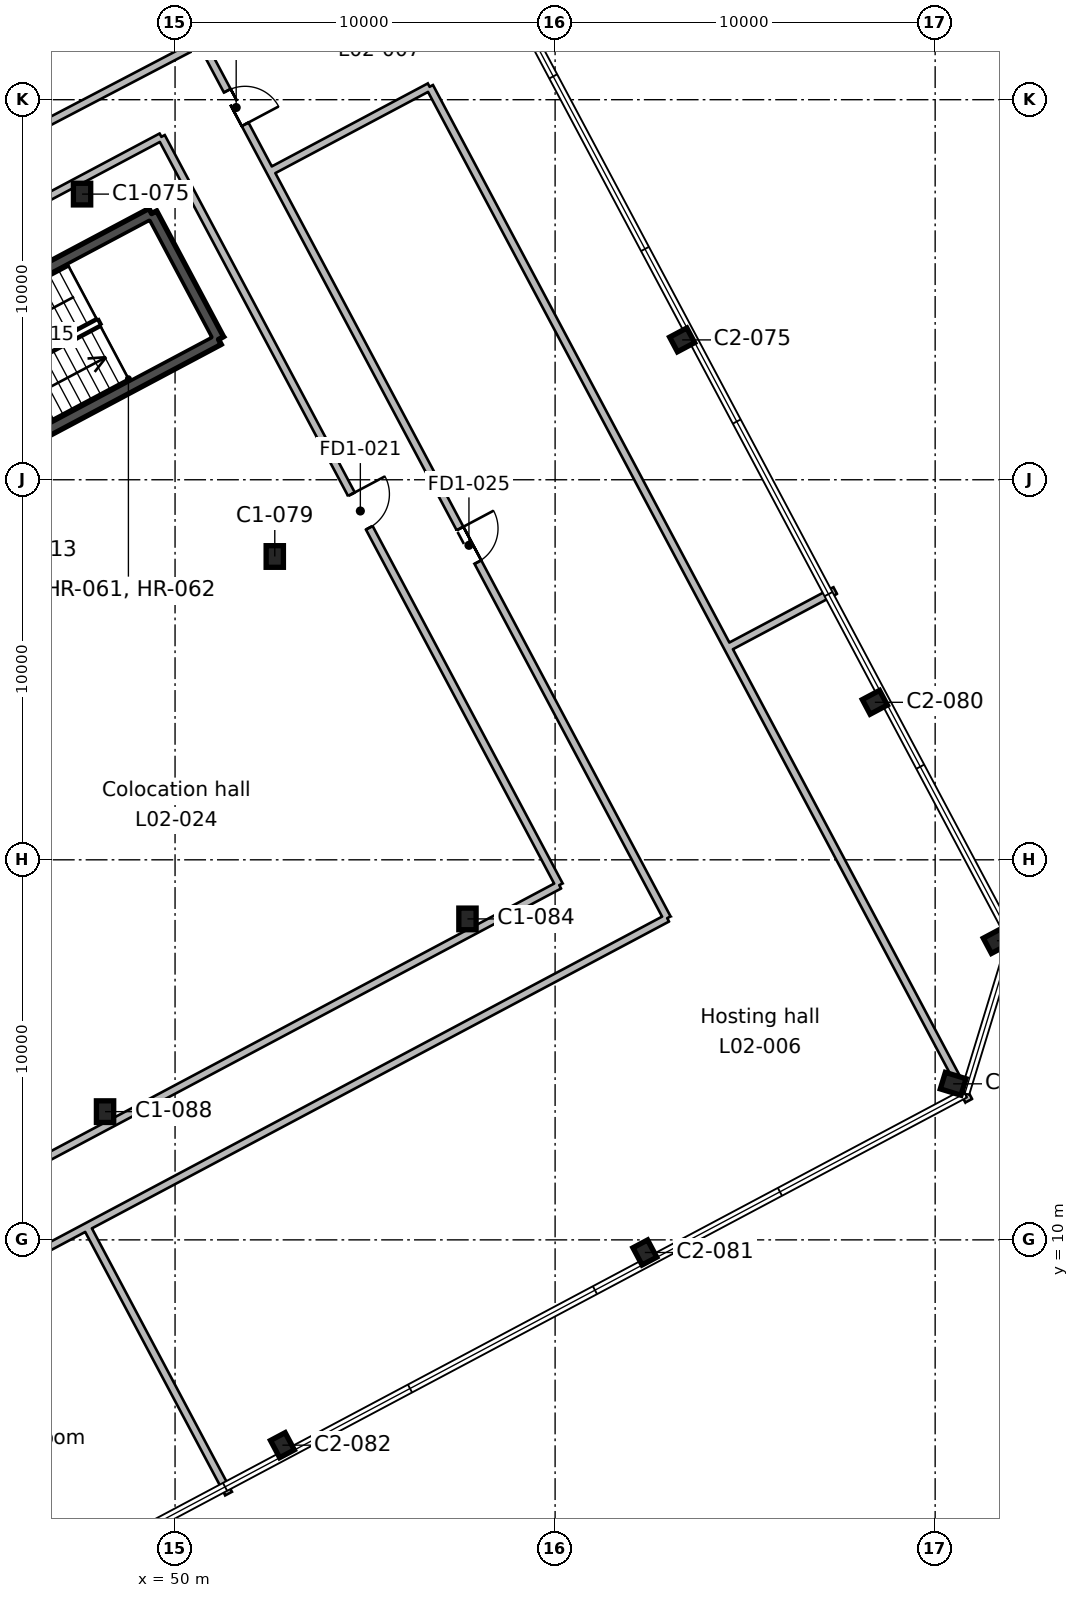
"""IFC4 building model, lengths in metres.
Left out: names, types, materials, properties, quantities, classifications, styles, units other than length and angle.
Written with IfcOpenShell. Run it as: python <this file> out.ifc"""

import sys

from ifc_helpers import new_model, si_unit, direction, frame, frame_2d, origin, origin_2d, place, context, subcontext, project, spatial, rectangle, i_section, extrude, element, fill, save


model = new_model("IFC4")
c1 = context("Model", 3, precision=1e-05, world=origin(), true_north=direction((0.0, 1.0)))
c2 = subcontext(c1, "Body", "Model", "MODEL_VIEW")
j1 = project(units=[si_unit("LENGTHUNIT", "METRE"), si_unit("PLANEANGLEUNIT", "RADIAN")], contexts=[c1])
p1 = place(None, origin())
s1 = spatial("IfcSite", under=j1, at=p1, CompositionType="ELEMENT")
p2 = place(p1, origin())
s2 = spatial("IfcBuilding", under=s1, at=p2, CompositionType="ELEMENT")
p3 = place(p2, frame((0.0, 0.0, 12.2)))
s3 = spatial("IfcBuildingStorey", under=s2, at=p3, CompositionType="ELEMENT", Elevation=12.2)
for number, where, z_axis, x_axis in (
    (1, (52.825, 4.598, 0.0), (0.0, 0.0, 1.0), (0.883, 0.469, 0.0)),
    (2, (62.361, 9.668, 0.0), (0.0, 0.0, 1.0), (0.883, 0.469, 0.0)),
):
    element("IfcColumn", number, at=place(p3, frame(where, z_axis=z_axis, x_axis=x_axis)), inside=s3, PredefinedType="COLUMN", context=c2, shape_type="SweptSolid", body=[
        extrude(i_section(OverallWidth=0.437, OverallDepth=0.513, WebThickness=0.061, FlangeThickness=0.097, FilletRadius=0.015, at=origin_2d()), origin(), (0.0, 0.0, 1.0), 5.4),
    ])
for number, where, z_axis, x_axis in (
    (3, (48.158, 13.374, 0.0), (0.0, 0.0, 1.0), (1.0, 0.0, 0.0)),
    (4, (70.474, 14.106, 0.0), (0.0, 0.0, 1.0), (0.292, 0.956, 0.0)),
    (5, (71.625, 17.871, 0.0), (0.0, 0.0, 1.0), (-0.469, 0.883, 0.0)),
    (6, (57.694, 18.445, 0.0), (0.0, 0.0, 1.0), (1.0, 0.0, 0.0)),
):
    element("IfcColumn", number, at=place(p3, frame(where, z_axis=z_axis, x_axis=x_axis)), inside=s3, PredefinedType="COLUMN", context=c2, shape_type="SweptSolid", body=[
        extrude(i_section(OverallWidth=0.455, OverallDepth=0.569, WebThickness=0.078, FlangeThickness=0.125, FilletRadius=0.015, at=origin_2d()), origin(), (0.0, 0.0, 1.0), 5.4),
    ])
p4 = place(p3, frame((68.413, 24.144, 0.0), z_axis=(0.0, 0.0, 1.0), x_axis=(-0.469471562786, 0.882947592859, 0.0)))
e7 = element("IfcColumn", 7, at=p4, inside=s3, PredefinedType="COLUMN", context=c2, shape_type="SweptSolid", body=[
    extrude(i_section(OverallWidth=0.437, OverallDepth=0.513, WebThickness=0.061, FlangeThickness=0.097, FilletRadius=0.015, at=origin_2d()), origin(), (0.0, 0.0, 1.0), 5.4),
])
p5 = place(p3, frame((52.624, 27.981, 0.0), z_axis=(0.0, 0.0, 1.0), x_axis=(1.0, 0.0, 0.0)))
e8 = element("IfcColumn", 8, at=p5, inside=s3, PredefinedType="COLUMN", context=c2, shape_type="SweptSolid", body=[
    extrude(i_section(OverallWidth=0.455, OverallDepth=0.569, WebThickness=0.078, FlangeThickness=0.125, FilletRadius=0.015, at=origin_2d()), origin(), (0.0, 0.0, 1.0), 5.4),
])
p6 = place(p3, frame((63.343, 33.68, 0.0), z_axis=(0.0, 0.0, 1.0), x_axis=(-0.469471562786, 0.882947592859, 0.0)))
e9 = element("IfcColumn", 9, at=p6, inside=s3, PredefinedType="COLUMN", context=c2, shape_type="SweptSolid", body=[
    extrude(i_section(OverallWidth=0.437, OverallDepth=0.513, WebThickness=0.061, FlangeThickness=0.097, FilletRadius=0.015, at=origin_2d()), origin(), (0.0, 0.0, 1.0), 5.4),
])
p7 = place(p3, frame((47.553, 37.516, 0.0), z_axis=(0.0, 0.0, 1.0), x_axis=(1.0, 0.0, 0.0)))
e10 = element("IfcColumn", 10, at=p7, inside=s3, PredefinedType="COLUMN", context=c2, shape_type="SweptSolid", body=[
    extrude(i_section(OverallWidth=0.455, OverallDepth=0.569, WebThickness=0.078, FlangeThickness=0.125, FilletRadius=0.015, at=origin_2d()), origin(), (0.0, 0.0, 1.0), 5.4),
])
p8 = place(p3, frame((49.384, 37.004, 0.0), z_axis=(0.0, 0.0, 1.0), x_axis=(0.46946936446, -0.882948761726, 0.0)))
e11 = element("IfcWall", 11, at=p8, inside=s3, PredefinedType="SHEAR", context=c2, shape_type="SweptSolid", body=[
    extrude(rectangle(XDim=3.75, YDim=0.3, at=frame_2d((1.875, 0.0))), origin(), (0.0, 0.0, 1.0), 5.4),
])
p9 = place(p3, frame((51.145, 33.693, 0.0), z_axis=(0.0, 0.0, 1.0), x_axis=(-0.882945809314, -0.469474917132, 0.0)))
e12 = element("IfcWall", 12, at=p9, inside=s3, PredefinedType="SHEAR", context=c2, shape_type="SweptSolid", body=[
    extrude(rectangle(XDim=8.3, YDim=0.3, at=frame_2d((4.15, 0.0))), origin(), (0.0, 0.0, 1.0), 5.4),
])
p10 = place(p9, frame((6.725, 0.0, 0.0)))
e13 = element("IfcOpeningElement", 13, at=p10, cuts=e12, PredefinedType="OPENING", context=c2, shape_type="SweptSolid", body=[
    extrude(rectangle(XDim=1.2, YDim=2.1, at=frame_2d((0.6, 1.05))), frame((0.0, 0.16, 0.0), z_axis=(0.0, -1.0, 0.0), x_axis=(1.0, 0.0, 0.0)), (0.0, 0.0, 1.0), 0.32),
])
p11 = place(p3, frame((42.055, 33.107, 0.0), z_axis=(0.0, 0.0, 1.0), x_axis=(0.882945809314, 0.469474917132, 0.0)))
e14 = element("IfcWall", 14, at=p11, inside=s3, PredefinedType="SHEAR", context=c2, shape_type="SweptSolid", body=[
    extrude(rectangle(XDim=8.3, YDim=0.3, at=frame_2d((4.15, 0.0))), origin(), (0.0, 0.0, 1.0), 5.4),
])
p12 = place(p3, frame((0.0, 15.007, 0.0), z_axis=(0.0, 0.0, 1.0), x_axis=(0.886151087154, 0.463396429352, 0.0)))
e15 = element("IfcWall", 15, at=p12, inside=s3, PredefinedType="PARTITIONING", context=c2, shape_type="SweptSolid", body=[
    extrude(rectangle(XDim=57.206, YDim=0.2, at=frame_2d((28.603, 0.0))), origin(), (0.0, 0.0, 1.0), 4.95),
])
p13 = place(p12, frame((35.149, 0.0, 0.0)))
e16 = element("IfcOpeningElement", 16, at=p13, cuts=e15, PredefinedType="OPENING", context=c2, shape_type="SweptSolid", body=[
    extrude(rectangle(XDim=1.0, YDim=2.1, at=frame_2d((0.5, 1.05))), frame((0.0, 0.11, 0.0), z_axis=(0.0, -1.0, 0.0), x_axis=(1.0, 0.0, 0.0)), (0.0, 0.0, 1.0), 0.22),
])
p14 = place(p12, frame((28.15, 0.0, 0.0)))
e17 = element("IfcOpeningElement", 17, at=p14, cuts=e15, PredefinedType="OPENING", context=c2, shape_type="SweptSolid", body=[
    extrude(rectangle(XDim=1.0, YDim=2.1, at=frame_2d((0.5, 1.05))), frame((0.0, 0.11, 0.0), z_axis=(0.0, -1.0, 0.0), x_axis=(1.0, 0.0, 0.0)), (0.0, 0.0, 1.0), 0.22),
])
p15 = place(p12, frame((23.949, 0.0, 0.0)))
e18 = element("IfcOpeningElement", 18, at=p15, cuts=e15, PredefinedType="OPENING", context=c2, shape_type="SweptSolid", body=[
    extrude(rectangle(XDim=1.0, YDim=2.1, at=frame_2d((0.5, 1.05))), frame((0.0, 0.11, 0.0), z_axis=(0.0, -1.0, 0.0), x_axis=(1.0, 0.0, 0.0)), (0.0, 0.0, 1.0), 0.22),
])
p16 = place(p12, frame((8.25, 0.0, 0.0)))
e19 = element("IfcOpeningElement", 19, at=p16, cuts=e15, PredefinedType="OPENING", context=c2, shape_type="SweptSolid", body=[
    extrude(rectangle(XDim=0.95, YDim=2.1, at=frame_2d((0.475, 1.05))), frame((0.0, 0.11, 0.0), z_axis=(0.0, -1.0, 0.0), x_axis=(1.0, 0.0, 0.0)), (0.0, 0.0, 1.0), 0.22),
])
p17 = place(p3, frame((47.736, 10.375, 0.0), z_axis=(0.0, 0.0, 1.0), x_axis=(-0.882953206174, -0.469461005524, 0.0)))
e20 = element("IfcWall", 20, at=p17, inside=s3, PredefinedType="PARTITIONING", context=c2, shape_type="SweptSolid", body=[
    extrude(rectangle(XDim=38.661, YDim=0.2, at=frame_2d((19.331, 0.0))), origin(), (0.0, 0.0, 1.0), 4.95),
])
p18 = place(p17, frame((18.85, 0.0, 0.0)))
e21 = element("IfcOpeningElement", 21, at=p18, cuts=e20, PredefinedType="OPENING", context=c2, shape_type="SweptSolid", body=[
    extrude(rectangle(XDim=1.0, YDim=2.1, at=frame_2d((0.5, 1.05))), frame((0.0, 0.11, 0.0), z_axis=(0.0, -1.0, 0.0), x_axis=(1.0, 0.0, 0.0)), (0.0, 0.0, 1.0), 0.22),
])
p19 = place(p17, frame((15.45, 0.0, 0.0)))
e22 = element("IfcOpeningElement", 22, at=p19, cuts=e20, PredefinedType="OPENING", context=c2, shape_type="SweptSolid", body=[
    extrude(rectangle(XDim=1.0, YDim=2.1, at=frame_2d((0.5, 1.05))), frame((0.0, 0.11, 0.0), z_axis=(0.0, -1.0, 0.0), x_axis=(1.0, 0.0, 0.0)), (0.0, 0.0, 1.0), 0.22),
])
p20 = place(p3, frame((47.677, 10.344, 0.0), z_axis=(0.0, 0.0, 1.0), x_axis=(0.46930940005, -0.883033797215, 0.0)))
e23 = element("IfcWall", 23, at=p20, inside=s3, PredefinedType="PARTITIONING", context=c2, shape_type="SweptSolid", body=[
    extrude(rectangle(XDim=7.95, YDim=0.2, at=frame_2d((3.975, 0.0))), origin(), (0.0, 0.0, 1.0), 4.95),
])
p21 = place(p3, frame((38.546, 40.882, 0.0), z_axis=(0.0, 0.0, 1.0), x_axis=(0.882973874067, 0.469422131685, 0.0)))
e24 = element("IfcWall", 24, at=p21, inside=s3, PredefinedType="PARTITIONING", context=c2, shape_type="SweptSolid", body=[
    extrude(rectangle(XDim=12.773, YDim=0.2, at=frame_2d((6.386, 0.0))), origin(), (0.0, 0.0, 1.0), 4.95),
])
p22 = place(p3, frame((43.858, 35.948, 0.0), z_axis=(0.0, 0.0, 1.0), x_axis=(0.882949648076, 0.469467697464, 0.0)))
e25 = element("IfcWall", 25, at=p22, inside=s3, PredefinedType="PARTITIONING", context=c2, shape_type="SweptSolid", body=[
    extrude(rectangle(XDim=6.55, YDim=0.2, at=frame_2d((3.275, 0.0))), origin(), (0.0, 0.0, 1.0), 4.95),
])
p23 = place(p3, frame((49.641, 39.023, 0.0), z_axis=(0.0, 0.0, 1.0), x_axis=(0.469459906809, -0.882953790353, 0.0)))
e26 = element("IfcWall", 26, at=p23, inside=s3, PredefinedType="PARTITIONING", context=c2, shape_type="SweptSolid", body=[
    extrude(rectangle(XDim=22.3, YDim=0.2, at=frame_2d((11.15, 0.0))), origin(), (0.0, 0.0, 1.0), 4.95),
])
p24 = place(p23, frame((10.65, 0.0, 0.0)))
e27 = element("IfcOpeningElement", 27, at=p24, cuts=e26, PredefinedType="OPENING", context=c2, shape_type="SweptSolid", body=[
    extrude(rectangle(XDim=1.0, YDim=2.1, at=frame_2d((0.5, 1.05))), frame((0.0, 0.11, 0.0), z_axis=(0.0, -1.0, 0.0), x_axis=(1.0, 0.0, 0.0)), (0.0, 0.0, 1.0), 0.22),
])
p25 = place(p3, frame((60.11, 19.333, 0.0), z_axis=(0.0, 0.0, 1.0), x_axis=(-0.882943552693, -0.469479161154, 0.0)))
e28 = element("IfcWall", 28, at=p25, inside=s3, PredefinedType="PARTITIONING", context=c2, shape_type="SweptSolid", body=[
    extrude(rectangle(XDim=22.15, YDim=0.2, at=frame_2d((11.075, 0.0))), origin(), (0.0, 0.0, 1.0), 4.95),
])
p26 = place(p3, frame((52.545, 38.033, 0.0), z_axis=(0.0, 0.0, 1.0), x_axis=(0.469474673387, -0.882945938916, 0.0)))
e29 = element("IfcWall", 29, at=p26, inside=s3, PredefinedType="PARTITIONING", context=c2, shape_type="SweptSolid", body=[
    extrude(rectangle(XDim=22.163, YDim=0.2, at=frame_2d((11.082, 0.0))), origin(), (0.0, 0.0, 1.0), 4.95),
])
p27 = place(p26, frame((10.551, 0.0, 0.0)))
e30 = element("IfcOpeningElement", 30, at=p27, cuts=e29, PredefinedType="OPENING", context=c2, shape_type="SweptSolid", body=[
    extrude(rectangle(XDim=1.0, YDim=2.1, at=frame_2d((0.5, 1.05))), frame((0.0, 0.11, 0.0), z_axis=(0.0, -1.0, 0.0), x_axis=(1.0, 0.0, 0.0)), (0.0, 0.0, 1.0), 0.22),
])
p28 = place(p3, frame((62.95, 18.464, 0.0), z_axis=(0.0, 0.0, 1.0), x_axis=(-0.882953495127, -0.469460462065, 0.0)))
e31 = element("IfcWall", 31, at=p28, inside=s3, PredefinedType="PARTITIONING", context=c2, shape_type="SweptSolid", body=[
    extrude(rectangle(XDim=17.231, YDim=0.2, at=frame_2d((8.615, 0.0))), origin(), (0.0, 0.0, 1.0), 4.95),
])
p29 = place(p3, frame((50.693, 41.516, 0.0), z_axis=(0.0, 0.0, 1.0), x_axis=(0.469428212836, -0.882970641071, 0.0)))
e32 = element("IfcWall", 32, at=p29, inside=s3, PredefinedType="PARTITIONING", context=c2, shape_type="SweptSolid", body=[
    extrude(rectangle(XDim=3.945, YDim=0.2, at=frame_2d((1.972, 0.0))), origin(), (0.0, 0.0, 1.0), 4.95),
])
p30 = place(p29, frame((1.45, 0.0, 0.0)))
e33 = element("IfcOpeningElement", 33, at=p30, cuts=e32, PredefinedType="OPENING", context=c2, shape_type="SweptSolid", body=[
    extrude(rectangle(XDim=1.0, YDim=2.1, at=frame_2d((0.5, 1.05))), frame((0.0, 0.11, 0.0), z_axis=(0.0, -1.0, 0.0), x_axis=(1.0, 0.0, 0.0)), (0.0, 0.0, 1.0), 0.22),
])
p31 = place(p3, frame((52.52, 38.118, 0.0), z_axis=(0.0, 0.0, 1.0), x_axis=(0.882886497292, 0.469586448802, 0.0)))
e34 = element("IfcWall", 34, at=p31, inside=s3, PredefinedType="PARTITIONING", context=c2, shape_type="SweptSolid", body=[
    extrude(rectangle(XDim=4.732, YDim=0.2, at=frame_2d((2.366, 0.0))), origin(), (0.0, 0.0, 1.0), 4.95),
])
p32 = place(p3, frame((56.698, 40.34, 0.0), z_axis=(0.0, 0.0, 1.0), x_axis=(0.469433248113, -0.882967964065, 0.0)))
e35 = element("IfcWall", 35, at=p32, inside=s3, PredefinedType="PARTITIONING", context=c2, shape_type="SweptSolid", body=[
    extrude(rectangle(XDim=14.509, YDim=0.2, at=frame_2d((7.254, 0.0))), origin(), (0.0, 0.0, 1.0), 4.95),
])
p33 = place(p3, frame((63.509, 27.529, 0.0), z_axis=(0.0, 0.0, 1.0), x_axis=(0.469480983661, -0.882942583627, 0.0)))
e36 = element("IfcWall", 36, at=p33, inside=s3, PredefinedType="PARTITIONING", context=c2, shape_type="SweptSolid", body=[
    extrude(rectangle(XDim=15.707, YDim=0.2, at=frame_2d((7.854, 0.0))), origin(), (0.0, 0.0, 1.0), 4.95),
])
p34 = place(p3, frame((67.37, 27.085, 0.0), z_axis=(0.0, 0.0, 1.0), x_axis=(-0.882918137105, -0.469526956809, 0.0)))
e37 = element("IfcWall", 37, at=p34, inside=s3, PredefinedType="PARTITIONING", context=c2, shape_type="SweptSolid", body=[
    extrude(rectangle(XDim=3.201, YDim=0.2, at=frame_2d((1.601, 0.0))), origin(), (0.0, 0.0, 1.0), 4.95),
])
p35 = place(p27, origin())
e38 = element("IfcDoor", 38, at=p35, inside=s3, OperationType="SINGLE_SWING_LEFT", PredefinedType="DOOR", context=c2, shape_type="SweptSolid", body=[
    extrude(rectangle(XDim=1.0, YDim=2.1, at=frame_2d((0.5, 1.05))), frame((0.0, 0.025, 0.0), z_axis=(0.0, -1.0, 0.0), x_axis=(1.0, 0.0, 0.0)), (0.0, 0.0, 1.0), 0.05),
])
fill(e30, e38)
p36 = place(p30, origin())
e39 = element("IfcDoor", 39, at=p36, inside=s3, OperationType="SINGLE_SWING_RIGHT", PredefinedType="DOOR", context=c2, shape_type="SweptSolid", body=[
    extrude(rectangle(XDim=1.0, YDim=2.1, at=frame_2d((0.5, 1.05))), frame((0.0, 0.025, 0.0), z_axis=(0.0, -1.0, 0.0), x_axis=(1.0, 0.0, 0.0)), (0.0, 0.0, 1.0), 0.05),
])
fill(e33, e39)
p37 = place(p24, origin())
e40 = element("IfcDoor", 40, at=p37, inside=s3, OperationType="SINGLE_SWING_LEFT", PredefinedType="DOOR", context=c2, shape_type="SweptSolid", body=[
    extrude(rectangle(XDim=1.0, YDim=2.1, at=frame_2d((0.5, 1.05))), frame((0.0, 0.025, 0.0), z_axis=(0.0, -1.0, 0.0), x_axis=(1.0, 0.0, 0.0)), (0.0, 0.0, 1.0), 0.05),
])
fill(e27, e40)
save(model, sys.argv[1])
